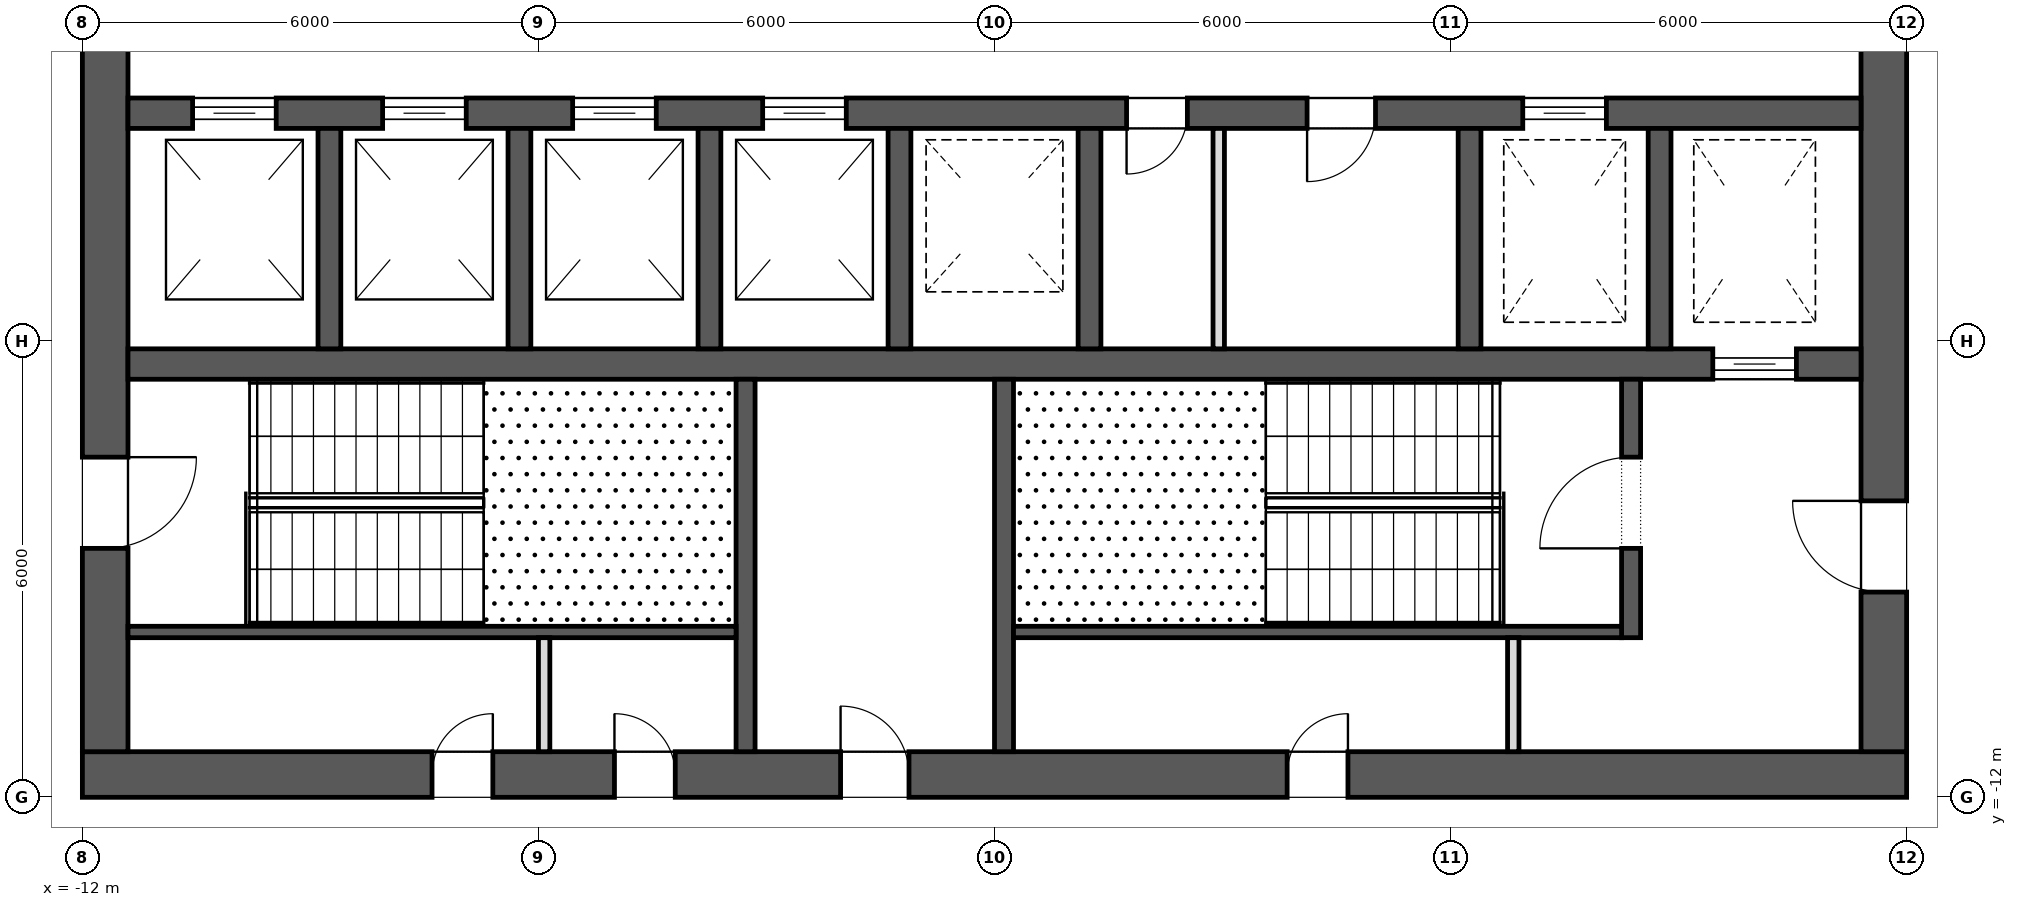
"""IFC4 building model, lengths in metres.
Left out: names, types, materials, properties, quantities, classifications, styles, units other than length and angle.
Written with IfcOpenShell. Run it as: python <this file> out.ifc"""

import sys

from ifc_helpers import new_model, si_unit, direction, frame, frame_2d, origin, place, context, subcontext, project, spatial, rectangle, extrude, element, fill, save


model = new_model("IFC4")
c1 = context("Model", 3, precision=1e-05, world=origin(), true_north=direction((0.0, 1.0)))
c2 = subcontext(c1, "Body", "Model", "MODEL_VIEW")
j1 = project(units=[si_unit("LENGTHUNIT", "METRE"), si_unit("PLANEANGLEUNIT", "RADIAN")], contexts=[c1])
p1 = place(None, origin())
s1 = spatial("IfcSite", under=j1, at=p1, CompositionType="ELEMENT")
p2 = place(p1, origin())
s2 = spatial("IfcBuilding", under=s1, at=p2, CompositionType="ELEMENT")
p3 = place(p2, frame((0.0, 0.0, 190.9)))
s3 = spatial("IfcBuildingStorey", under=s2, at=p3, CompositionType="ELEMENT", Elevation=190.9)
p4 = place(p3, frame((-12.0, -11.7, 0.0), z_axis=(0.0, 0.0, 1.0), x_axis=(1.0, 0.0, 0.0)))
e1 = element("IfcWall", 1, at=p4, inside=s3, PredefinedType="SHEAR", context=c2, shape_type="SweptSolid", body=[
    extrude(rectangle(XDim=24.0, YDim=0.6, at=frame_2d((12.0, 0.0))), origin(), (0.0, 0.0, 1.0), 4.0),
])
p5 = place(p4, frame((9.975, 0.0, 0.0)))
e2 = element("IfcOpeningElement", 2, at=p5, cuts=e1, PredefinedType="OPENING", context=c2, shape_type="SweptSolid", body=[
    extrude(rectangle(XDim=0.9, YDim=2.1, at=frame_2d((0.45, 1.05))), frame((0.0, 0.312, 0.0), z_axis=(0.0, -1.0, 0.0), x_axis=(1.0, 0.0, 0.0)), (0.0, 0.0, 1.0), 0.624),
])
p6 = place(p4, frame((4.6, 0.0, 0.0)))
e3 = element("IfcOpeningElement", 3, at=p6, cuts=e1, PredefinedType="OPENING", context=c2, shape_type="SweptSolid", body=[
    extrude(rectangle(XDim=0.8, YDim=2.1, at=frame_2d((0.4, 1.05))), frame((0.0, 0.312, 0.0), z_axis=(0.0, -1.0, 0.0), x_axis=(1.0, 0.0, 0.0)), (0.0, 0.0, 1.0), 0.624),
])
p7 = place(p4, frame((7.0, 0.0, 0.0)))
e4 = element("IfcOpeningElement", 4, at=p7, cuts=e1, PredefinedType="OPENING", context=c2, shape_type="SweptSolid", body=[
    extrude(rectangle(XDim=0.8, YDim=2.1, at=frame_2d((0.4, 1.05))), frame((0.0, 0.312, 0.0), z_axis=(0.0, -1.0, 0.0), x_axis=(1.0, 0.0, 0.0)), (0.0, 0.0, 1.0), 0.624),
])
p8 = place(p4, frame((15.85, 0.0, 0.0)))
e5 = element("IfcOpeningElement", 5, at=p8, cuts=e1, PredefinedType="OPENING", context=c2, shape_type="SweptSolid", body=[
    extrude(rectangle(XDim=0.8, YDim=2.1, at=frame_2d((0.4, 1.05))), frame((0.0, 0.312, 0.0), z_axis=(0.0, -1.0, 0.0), x_axis=(1.0, 0.0, 0.0)), (0.0, 0.0, 1.0), 0.624),
])
p9 = place(p3, frame((11.7, -11.4, 0.0), z_axis=(0.0, 0.0, 1.0), x_axis=(0.0, 1.0, 0.0)))
e6 = element("IfcWall", 6, at=p9, inside=s3, PredefinedType="SHEAR", context=c2, shape_type="SweptSolid", body=[
    extrude(rectangle(XDim=22.8, YDim=0.6, at=frame_2d((11.4, 0.0))), origin(), (0.0, 0.0, 1.0), 4.0),
])
p10 = place(p9, frame((10.2, 0.0, 0.0)))
e7 = element("IfcOpeningElement", 7, at=p10, cuts=e6, PredefinedType="OPENING", context=c2, shape_type="SweptSolid", body=[
    extrude(rectangle(XDim=2.4, YDim=2.1, at=frame_2d((1.2, 1.05))), frame((0.0, 0.312, 0.0), z_axis=(0.0, -1.0, 0.0), x_axis=(1.0, 0.0, 0.0)), (0.0, 0.0, 1.0), 0.624),
])
p11 = place(p9, frame((19.5, 0.0, 0.0)))
e8 = element("IfcOpeningElement", 8, at=p11, cuts=e6, PredefinedType="OPENING", context=c2, shape_type="SweptSolid", body=[
    extrude(rectangle(XDim=1.2, YDim=2.1, at=frame_2d((0.6, 1.05))), frame((0.0, 0.312, 0.0), z_axis=(0.0, -1.0, 0.0), x_axis=(1.0, 0.0, 0.0)), (0.0, 0.0, 1.0), 0.624),
])
p12 = place(p9, frame((2.1, 0.0, 0.0)))
e9 = element("IfcOpeningElement", 9, at=p12, cuts=e6, PredefinedType="OPENING", context=c2, shape_type="SweptSolid", body=[
    extrude(rectangle(XDim=1.2, YDim=2.1, at=frame_2d((0.6, 1.05))), frame((0.0, 0.312, 0.0), z_axis=(0.0, -1.0, 0.0), x_axis=(1.0, 0.0, 0.0)), (0.0, 0.0, 1.0), 0.624),
])
p13 = place(p3, frame((-11.7, -11.4, 0.0), z_axis=(0.0, 0.0, 1.0), x_axis=(0.0, 1.0, 0.0)))
e10 = element("IfcWall", 10, at=p13, inside=s3, PredefinedType="SHEAR", context=c2, shape_type="SweptSolid", body=[
    extrude(rectangle(XDim=22.8, YDim=0.6, at=frame_2d((11.4, 0.0))), origin(), (0.0, 0.0, 1.0), 4.0),
])
p14 = place(p13, frame((10.2, 0.0, 0.0)))
e11 = element("IfcOpeningElement", 11, at=p14, cuts=e10, PredefinedType="OPENING", context=c2, shape_type="SweptSolid", body=[
    extrude(rectangle(XDim=2.4, YDim=2.1, at=frame_2d((1.2, 1.05))), frame((0.0, 0.312, 0.0), z_axis=(0.0, -1.0, 0.0), x_axis=(1.0, 0.0, 0.0)), (0.0, 0.0, 1.0), 0.624),
])
p15 = place(p13, frame((18.925, 0.0, 0.0)))
e12 = element("IfcOpeningElement", 12, at=p15, cuts=e10, PredefinedType="OPENING", context=c2, shape_type="SweptSolid", body=[
    extrude(rectangle(XDim=1.2, YDim=2.1, at=frame_2d((0.6, 1.05))), frame((0.0, 0.312, 0.0), z_axis=(0.0, -1.0, 0.0), x_axis=(1.0, 0.0, 0.0)), (0.0, 0.0, 1.0), 0.624),
])
p16 = place(p13, frame((2.675, 0.0, 0.0)))
e13 = element("IfcOpeningElement", 13, at=p16, cuts=e10, PredefinedType="OPENING", context=c2, shape_type="SweptSolid", body=[
    extrude(rectangle(XDim=1.2, YDim=2.1, at=frame_2d((0.6, 1.05))), frame((0.0, 0.312, 0.0), z_axis=(0.0, -1.0, 0.0), x_axis=(1.0, 0.0, 0.0)), (0.0, 0.0, 1.0), 0.624),
])
p17 = place(p3, frame((-11.4, -3.0, 0.0), z_axis=(0.0, 0.0, 1.0), x_axis=(1.0, 0.0, 0.0)))
e14 = element("IfcWall", 14, at=p17, inside=s3, PredefinedType="SHEAR", context=c2, shape_type="SweptSolid", body=[
    extrude(rectangle(XDim=22.8, YDim=0.4, at=frame_2d((11.4, 0.0))), origin(), (0.0, 0.0, 1.0), 4.0),
])
p18 = place(p17, frame((0.85, 0.0, 0.0)))
e15 = element("IfcOpeningElement", 15, at=p18, cuts=e14, PredefinedType="OPENING", context=c2, shape_type="SweptSolid", body=[
    extrude(rectangle(XDim=1.1, YDim=2.1, at=frame_2d((0.55, 1.05))), frame((0.0, 0.212, 0.0), z_axis=(0.0, -1.0, 0.0), x_axis=(1.0, 0.0, 0.0)), (0.0, 0.0, 1.0), 0.424),
])
p19 = place(p17, frame((3.35, 0.0, 0.0)))
e16 = element("IfcOpeningElement", 16, at=p19, cuts=e14, PredefinedType="OPENING", context=c2, shape_type="SweptSolid", body=[
    extrude(rectangle(XDim=1.1, YDim=2.1, at=frame_2d((0.55, 1.05))), frame((0.0, 0.212, 0.0), z_axis=(0.0, -1.0, 0.0), x_axis=(1.0, 0.0, 0.0)), (0.0, 0.0, 1.0), 0.424),
])
p20 = place(p17, frame((5.85, 0.0, 0.0)))
e17 = element("IfcOpeningElement", 17, at=p20, cuts=e14, PredefinedType="OPENING", context=c2, shape_type="SweptSolid", body=[
    extrude(rectangle(XDim=1.1, YDim=2.1, at=frame_2d((0.55, 1.05))), frame((0.0, 0.212, 0.0), z_axis=(0.0, -1.0, 0.0), x_axis=(1.0, 0.0, 0.0)), (0.0, 0.0, 1.0), 0.424),
])
p21 = place(p17, frame((8.35, 0.0, 0.0)))
e18 = element("IfcOpeningElement", 18, at=p21, cuts=e14, PredefinedType="OPENING", context=c2, shape_type="SweptSolid", body=[
    extrude(rectangle(XDim=1.1, YDim=2.1, at=frame_2d((0.55, 1.05))), frame((0.0, 0.212, 0.0), z_axis=(0.0, -1.0, 0.0), x_axis=(1.0, 0.0, 0.0)), (0.0, 0.0, 1.0), 0.424),
])
p22 = place(p17, frame((18.35, 0.0, 0.0)))
e19 = element("IfcOpeningElement", 19, at=p22, cuts=e14, PredefinedType="OPENING", context=c2, shape_type="SweptSolid", body=[
    extrude(rectangle(XDim=1.1, YDim=2.1, at=frame_2d((0.55, 1.05))), frame((0.0, 0.212, 0.0), z_axis=(0.0, -1.0, 0.0), x_axis=(1.0, 0.0, 0.0)), (0.0, 0.0, 1.0), 0.424),
])
p23 = place(p17, frame((13.137, 0.0, 0.0)))
e20 = element("IfcOpeningElement", 20, at=p23, cuts=e14, PredefinedType="OPENING", context=c2, shape_type="SweptSolid", body=[
    extrude(rectangle(XDim=0.8, YDim=2.1, at=frame_2d((0.4, 1.05))), frame((0.0, 0.212, 0.0), z_axis=(0.0, -1.0, 0.0), x_axis=(1.0, 0.0, 0.0)), (0.0, 0.0, 1.0), 0.424),
])
p24 = place(p17, frame((15.512, 0.0, 0.0)))
e21 = element("IfcOpeningElement", 21, at=p24, cuts=e14, PredefinedType="OPENING", context=c2, shape_type="SweptSolid", body=[
    extrude(rectangle(XDim=0.9, YDim=2.1, at=frame_2d((0.45, 1.05))), frame((0.0, 0.212, 0.0), z_axis=(0.0, -1.0, 0.0), x_axis=(1.0, 0.0, 0.0)), (0.0, 0.0, 1.0), 0.424),
])
p25 = place(p3, frame((-11.4, -6.3, 0.0), z_axis=(0.0, 0.0, 1.0), x_axis=(1.0, 0.0, 0.0)))
e22 = element("IfcWall", 22, at=p25, inside=s3, PredefinedType="SHEAR", context=c2, shape_type="SweptSolid", body=[
    extrude(rectangle(XDim=22.8, YDim=0.4, at=frame_2d((11.4, 0.0))), origin(), (0.0, 0.0, 1.0), 4.0),
])
p26 = place(p25, frame((20.85, 0.0, 0.0)))
e23 = element("IfcOpeningElement", 23, at=p26, cuts=e22, PredefinedType="OPENING", context=c2, shape_type="SweptSolid", body=[
    extrude(rectangle(XDim=1.1, YDim=2.1, at=frame_2d((0.55, 1.05))), frame((0.0, 0.212, 0.0), z_axis=(0.0, -1.0, 0.0), x_axis=(1.0, 0.0, 0.0)), (0.0, 0.0, 1.0), 0.424),
])
for number, where, z_axis, x_axis in (
    (24, (-8.75, -6.1, 0.0), (0.0, 0.0, 1.0), (0.0, 1.0, 0.0)),
    (25, (-6.25, -6.1, 0.0), (0.0, 0.0, 1.0), (0.0, 1.0, 0.0)),
    (26, (-3.75, -6.1, 0.0), (0.0, 0.0, 1.0), (0.0, 1.0, 0.0)),
    (27, (-1.25, -6.1, 0.0), (0.0, 0.0, 1.0), (0.0, 1.0, 0.0)),
    (28, (1.25, -6.1, 0.0), (0.0, 0.0, 1.0), (0.0, 1.0, 0.0)),
    (29, (6.25, -6.1, 0.0), (0.0, 0.0, 1.0), (0.0, 1.0, 0.0)),
    (30, (8.75, -6.1, 0.0), (0.0, 0.0, 1.0), (0.0, 1.0, 0.0)),
):
    element("IfcWall", number, at=place(p3, frame(where, z_axis=z_axis, x_axis=x_axis)), inside=s3, PredefinedType="SHEAR", context=c2, shape_type="SweptSolid", body=[
        extrude(rectangle(XDim=2.9, YDim=0.3, at=frame_2d((1.45, 0.0))), origin(), (0.0, 0.0, 1.0), 4.0),
    ])
for number, where, z_axis, x_axis in (
    (31, (-3.275, -11.4, 0.0), (0.0, 0.0, 1.0), (0.0, 1.0, 0.0)),
    (32, (0.125, -11.4, 0.0), (0.0, 0.0, 1.0), (0.0, 1.0, 0.0)),
):
    element("IfcWall", number, at=place(p3, frame(where, z_axis=z_axis, x_axis=x_axis)), inside=s3, PredefinedType="SHEAR", context=c2, shape_type="SweptSolid", body=[
        extrude(rectangle(XDim=4.9, YDim=0.25, at=frame_2d((2.45, 0.0))), origin(), (0.0, 0.0, 1.0), 3.7),
    ])
p27 = place(p3, frame((8.375, -9.9, 0.0), z_axis=(0.0, 0.0, 1.0), x_axis=(0.0, 1.0, 0.0)))
e33 = element("IfcWall", 33, at=p27, inside=s3, PredefinedType="SHEAR", context=c2, shape_type="SweptSolid", body=[
    extrude(rectangle(XDim=3.4, YDim=0.25, at=frame_2d((1.7, 0.0))), origin(), (0.0, 0.0, 1.0), 3.7),
])
p28 = place(p27, frame((1.175, 0.0, 0.0)))
e34 = element("IfcOpeningElement", 34, at=p28, cuts=e33, PredefinedType="OPENING", context=c2, shape_type="SweptSolid", body=[
    extrude(rectangle(XDim=1.2, YDim=2.1, at=frame_2d((0.6, 1.05))), frame((0.0, 0.137, 0.0), z_axis=(0.0, -1.0, 0.0), x_axis=(1.0, 0.0, 0.0)), (0.0, 0.0, 1.0), 0.274),
])
for number, where, z_axis, x_axis in (
    (35, (-11.4, -9.825, 0.0), (0.0, 0.0, 1.0), (1.0, 0.0, 0.0)),
    (36, (0.25, -9.825, 0.0), (0.0, 0.0, 1.0), (1.0, 0.0, 0.0)),
):
    element("IfcWall", number, at=place(p3, frame(where, z_axis=z_axis, x_axis=x_axis)), inside=s3, PredefinedType="SHEAR", context=c2, shape_type="SweptSolid", body=[
        extrude(rectangle(XDim=8.0, YDim=0.15, at=frame_2d((4.0, 0.0))), origin(), (0.0, 0.0, 1.0), 3.7),
    ])
for number, where, z_axis, x_axis in (
    (37, (-5.925, -11.4, 0.0), (0.0, 0.0, 1.0), (0.0, 1.0, 0.0)),
    (38, (6.825, -11.4, 0.0), (0.0, 0.0, 1.0), (0.0, 1.0, 0.0)),
):
    element("IfcWall", number, at=place(p3, frame(where, z_axis=z_axis, x_axis=x_axis)), inside=s3, PredefinedType="PARTITIONING", context=c2, shape_type="SweptSolid", body=[
        extrude(rectangle(XDim=1.5, YDim=0.15, at=frame_2d((0.75, 0.0))), origin(), (0.0, 0.0, 1.0), 3.7),
    ])
p29 = place(p3, frame((2.95, -6.1, 0.0), z_axis=(0.0, 0.0, 1.0), x_axis=(0.0, 1.0, 0.0)))
e39 = element("IfcWall", 39, at=p29, inside=s3, PredefinedType="PARTITIONING", context=c2, shape_type="SweptSolid", body=[
    extrude(rectangle(XDim=2.9, YDim=0.15, at=frame_2d((1.45, 0.0))), origin(), (0.0, 0.0, 1.0), 3.7),
])
p30 = place(p26, origin())
e40 = element("IfcDoor", 40, at=p30, inside=s3, OperationType="SLIDING_TO_LEFT", PredefinedType="DOOR", context=c2, shape_type="SweptSolid", body=[
    extrude(rectangle(XDim=1.1, YDim=2.1, at=frame_2d((0.55, 1.05))), frame((0.0, 0.025, 0.0), z_axis=(0.0, -1.0, 0.0), x_axis=(1.0, 0.0, 0.0)), (0.0, 0.0, 1.0), 0.05),
])
fill(e23, e40)
p31 = place(p18, origin())
e41 = element("IfcDoor", 41, at=p31, inside=s3, OperationType="SLIDING_TO_LEFT", PredefinedType="DOOR", context=c2, shape_type="SweptSolid", body=[
    extrude(rectangle(XDim=1.1, YDim=2.1, at=frame_2d((0.55, 1.05))), frame((0.0, 0.025, 0.0), z_axis=(0.0, -1.0, 0.0), x_axis=(1.0, 0.0, 0.0)), (0.0, 0.0, 1.0), 0.05),
])
fill(e15, e41)
p32 = place(p19, origin())
e42 = element("IfcDoor", 42, at=p32, inside=s3, OperationType="SLIDING_TO_LEFT", PredefinedType="DOOR", context=c2, shape_type="SweptSolid", body=[
    extrude(rectangle(XDim=1.1, YDim=2.1, at=frame_2d((0.55, 1.05))), frame((0.0, 0.025, 0.0), z_axis=(0.0, -1.0, 0.0), x_axis=(1.0, 0.0, 0.0)), (0.0, 0.0, 1.0), 0.05),
])
fill(e16, e42)
p33 = place(p20, origin())
e43 = element("IfcDoor", 43, at=p33, inside=s3, OperationType="SLIDING_TO_LEFT", PredefinedType="DOOR", context=c2, shape_type="SweptSolid", body=[
    extrude(rectangle(XDim=1.1, YDim=2.1, at=frame_2d((0.55, 1.05))), frame((0.0, 0.025, 0.0), z_axis=(0.0, -1.0, 0.0), x_axis=(1.0, 0.0, 0.0)), (0.0, 0.0, 1.0), 0.05),
])
fill(e17, e43)
p34 = place(p21, origin())
e44 = element("IfcDoor", 44, at=p34, inside=s3, OperationType="SLIDING_TO_LEFT", PredefinedType="DOOR", context=c2, shape_type="SweptSolid", body=[
    extrude(rectangle(XDim=1.1, YDim=2.1, at=frame_2d((0.55, 1.05))), frame((0.0, 0.025, 0.0), z_axis=(0.0, -1.0, 0.0), x_axis=(1.0, 0.0, 0.0)), (0.0, 0.0, 1.0), 0.05),
])
fill(e18, e44)
p35 = place(p22, origin())
e45 = element("IfcDoor", 45, at=p35, inside=s3, OperationType="SLIDING_TO_LEFT", PredefinedType="DOOR", context=c2, shape_type="SweptSolid", body=[
    extrude(rectangle(XDim=1.1, YDim=2.1, at=frame_2d((0.55, 1.05))), frame((0.0, 0.025, 0.0), z_axis=(0.0, -1.0, 0.0), x_axis=(1.0, 0.0, 0.0)), (0.0, 0.0, 1.0), 0.05),
])
fill(e19, e45)
p36 = place(p16, frame((1.2, 0.0, 0.0), z_axis=(0.0, 0.0, 1.0), x_axis=(-1.0, 0.0, 0.0)))
e46 = element("IfcDoor", 46, at=p36, inside=s3, OperationType="SINGLE_SWING_RIGHT", PredefinedType="DOOR", context=c2, shape_type="SweptSolid", body=[
    extrude(rectangle(XDim=1.2, YDim=2.1, at=frame_2d((0.6, 1.05))), frame((0.0, 0.025, 0.0), z_axis=(0.0, -1.0, 0.0), x_axis=(1.0, 0.0, 0.0)), (0.0, 0.0, 1.0), 0.05),
])
fill(e13, e46)
p37 = place(p28, origin())
e47 = element("IfcDoor", 47, at=p37, inside=s3, OperationType="SINGLE_SWING_RIGHT", PredefinedType="DOOR", context=c2, shape_type="SweptSolid", body=[
    extrude(rectangle(XDim=1.2, YDim=2.1, at=frame_2d((0.6, 1.05))), frame((0.0, 0.025, 0.0), z_axis=(0.0, -1.0, 0.0), x_axis=(1.0, 0.0, 0.0)), (0.0, 0.0, 1.0), 0.05),
])
fill(e34, e47)
p38 = place(p12, origin())
e48 = element("IfcDoor", 48, at=p38, inside=s3, OperationType="SINGLE_SWING_LEFT", PredefinedType="DOOR", context=c2, shape_type="SweptSolid", body=[
    extrude(rectangle(XDim=1.2, YDim=2.1, at=frame_2d((0.6, 1.05))), frame((0.0, 0.025, 0.0), z_axis=(0.0, -1.0, 0.0), x_axis=(1.0, 0.0, 0.0)), (0.0, 0.0, 1.0), 0.05),
])
fill(e9, e48)
p39 = place(p5, origin())
e49 = element("IfcDoor", 49, at=p39, inside=s3, OperationType="SINGLE_SWING_RIGHT", PredefinedType="DOOR", context=c2, shape_type="SweptSolid", body=[
    extrude(rectangle(XDim=0.9, YDim=2.1, at=frame_2d((0.45, 1.05))), frame((0.0, 0.025, 0.0), z_axis=(0.0, -1.0, 0.0), x_axis=(1.0, 0.0, 0.0)), (0.0, 0.0, 1.0), 0.05),
])
fill(e2, e49)
p40 = place(p6, origin())
e50 = element("IfcDoor", 50, at=p40, inside=s3, OperationType="SINGLE_SWING_LEFT", PredefinedType="DOOR", context=c2, shape_type="SweptSolid", body=[
    extrude(rectangle(XDim=0.8, YDim=2.1, at=frame_2d((0.4, 1.05))), frame((0.0, 0.025, 0.0), z_axis=(0.0, -1.0, 0.0), x_axis=(1.0, 0.0, 0.0)), (0.0, 0.0, 1.0), 0.05),
])
fill(e3, e50)
p41 = place(p7, origin())
e51 = element("IfcDoor", 51, at=p41, inside=s3, OperationType="SINGLE_SWING_RIGHT", PredefinedType="DOOR", context=c2, shape_type="SweptSolid", body=[
    extrude(rectangle(XDim=0.8, YDim=2.1, at=frame_2d((0.4, 1.05))), frame((0.0, 0.025, 0.0), z_axis=(0.0, -1.0, 0.0), x_axis=(1.0, 0.0, 0.0)), (0.0, 0.0, 1.0), 0.05),
])
fill(e4, e51)
p42 = place(p8, origin())
e52 = element("IfcDoor", 52, at=p42, inside=s3, OperationType="SINGLE_SWING_LEFT", PredefinedType="DOOR", context=c2, shape_type="SweptSolid", body=[
    extrude(rectangle(XDim=0.8, YDim=2.1, at=frame_2d((0.4, 1.05))), frame((0.0, 0.025, 0.0), z_axis=(0.0, -1.0, 0.0), x_axis=(1.0, 0.0, 0.0)), (0.0, 0.0, 1.0), 0.05),
])
fill(e5, e52)
p43 = place(p23, frame((0.8, 0.0, 0.0), z_axis=(0.0, 0.0, 1.0), x_axis=(-1.0, 0.0, 0.0)))
e53 = element("IfcDoor", 53, at=p43, inside=s3, OperationType="SINGLE_SWING_LEFT", PredefinedType="DOOR", context=c2, shape_type="SweptSolid", body=[
    extrude(rectangle(XDim=0.8, YDim=2.1, at=frame_2d((0.4, 1.05))), frame((0.0, 0.025, 0.0), z_axis=(0.0, -1.0, 0.0), x_axis=(1.0, 0.0, 0.0)), (0.0, 0.0, 1.0), 0.05),
])
fill(e20, e53)
p44 = place(p24, frame((0.9, 0.0, 0.0), z_axis=(0.0, 0.0, 1.0), x_axis=(-1.0, 0.0, 0.0)))
e54 = element("IfcDoor", 54, at=p44, inside=s3, OperationType="SINGLE_SWING_LEFT", PredefinedType="DOOR", context=c2, shape_type="SweptSolid", body=[
    extrude(rectangle(XDim=0.9, YDim=2.1, at=frame_2d((0.45, 1.05))), frame((0.0, 0.025, 0.0), z_axis=(0.0, -1.0, 0.0), x_axis=(1.0, 0.0, 0.0)), (0.0, 0.0, 1.0), 0.05),
])
fill(e21, e54)
save(model, sys.argv[1])
